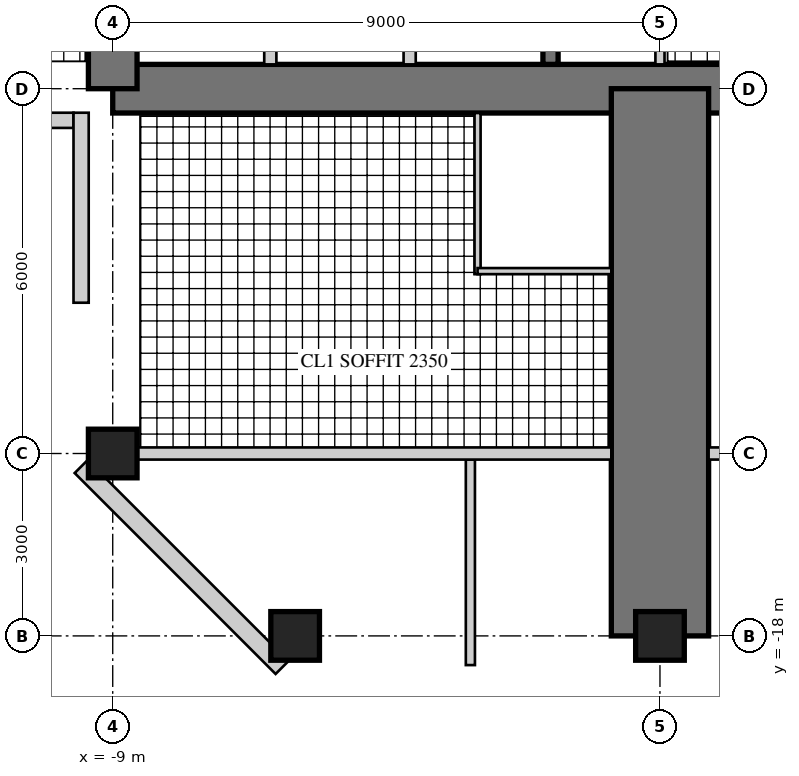
"""IFC4 building model, lengths in metres.
Left out: names, types, materials, properties, quantities, classifications, styles, units other than length and angle.
Written with IfcOpenShell. Run it as: python <this file> out.ifc"""

import sys

from ifc_helpers import new_model, si_unit, direction, frame, frame_2d, origin, origin_2d, place, context, subcontext, project, spatial, rectangle, hollow_rectangle, extrude, element, fill, save


model = new_model("IFC4")
c1 = context("Model", 3, precision=1e-05, world=origin(), true_north=direction((0.0, 1.0)))
c2 = subcontext(c1, "Body", "Model", "MODEL_VIEW")
j1 = project(units=[si_unit("LENGTHUNIT", "METRE"), si_unit("PLANEANGLEUNIT", "RADIAN")], contexts=[c1])
p1 = place(None, origin())
s1 = spatial("IfcSite", under=j1, at=p1, CompositionType="ELEMENT")
p2 = place(p1, origin())
s2 = spatial("IfcBuilding", under=s1, at=p2, CompositionType="ELEMENT")
p3 = place(p2, frame((0.0, 0.0, 225.5)))
s3 = spatial("IfcBuildingStorey", under=s2, at=p3, CompositionType="ELEMENT", Elevation=225.5)
p4 = place(p3, frame((-9.0, -9.0, 0.0), z_axis=(0.0, 0.0, 1.0), x_axis=(1.0, 0.0, 0.0)))
e1 = element("IfcWall", 1, at=p4, inside=s3, PredefinedType="SHEAR", context=c2, shape_type="SweptSolid", body=[
    extrude(rectangle(XDim=18.0, YDim=0.8, at=frame_2d((9.0, 0.0))), origin(), (0.0, 0.0, 1.0), 3.4),
])
p5 = place(p4, frame((9.8, 0.0, 0.0)))
e2 = element("IfcOpeningElement", 2, at=p5, cuts=e1, PredefinedType="OPENING", context=c2, shape_type="SweptSolid", body=[
    extrude(rectangle(XDim=1.0, YDim=2.4, at=frame_2d((0.5, 1.2))), frame((0.0, 0.41, 0.0), z_axis=(0.0, -1.0, 0.0), x_axis=(1.0, 0.0, 0.0)), (0.0, 0.0, 1.0), 0.82),
])
p6 = place(p3, frame((-9.0, 9.0, 0.0), z_axis=(0.0, 0.0, 1.0), x_axis=(0.0, -1.0, 0.0)))
e3 = element("IfcWall", 3, at=p6, inside=s3, PredefinedType="SHEAR", context=c2, shape_type="SweptSolid", body=[
    extrude(rectangle(XDim=18.0, YDim=0.8, at=frame_2d((9.0, 0.0))), origin(), (0.0, 0.0, 1.0), 3.4),
])
p7 = place(p6, frame((9.8, 0.0, 0.0)))
e4 = element("IfcOpeningElement", 4, at=p7, cuts=e3, PredefinedType="OPENING", context=c2, shape_type="SweptSolid", body=[
    extrude(rectangle(XDim=1.0, YDim=2.4, at=frame_2d((0.5, 1.2))), frame((0.0, 0.41, 0.0), z_axis=(0.0, -1.0, 0.0), x_axis=(1.0, 0.0, 0.0)), (0.0, 0.0, 1.0), 0.82),
])
p8 = place(p3, frame((-1.8, -1.875, 0.0), z_axis=(0.0, 0.0, 1.0), x_axis=(0.0, -1.0, 0.0)))
e5 = element("IfcWall", 5, at=p8, inside=s3, PredefinedType="SHEAR", context=c2, shape_type="SweptSolid", body=[
    extrude(rectangle(XDim=6.725, YDim=0.25, at=frame_2d((3.363, 0.0))), origin(), (0.0, 0.0, 1.0), 3.4),
])
p9 = place(p8, frame((1.875, 0.0, 0.0)))
e6 = element("IfcOpeningElement", 6, at=p9, cuts=e5, PredefinedType="OPENING", context=c2, shape_type="SweptSolid", body=[
    extrude(rectangle(XDim=1.6, YDim=2.4, at=frame_2d((0.8, 1.2))), frame((0.0, 0.135, 0.0), z_axis=(0.0, -1.0, 0.0), x_axis=(1.0, 0.0, 0.0)), (0.0, 0.0, 1.0), 0.27),
])
for number, where, z_axis, x_axis in (
    (7, (-4.117, -5.975, 0.0), (0.0, 0.0, 1.0), (0.0, -1.0, 0.0)),
    (8, (-6.408, -5.975, 0.0), (0.0, 0.0, 1.0), (0.0, -1.0, 0.0)),
):
    element("IfcWall", number, at=place(p3, frame(where, z_axis=z_axis, x_axis=x_axis)), inside=s3, PredefinedType="PARTITIONING", context=c2, shape_type="SweptSolid", body=[
        extrude(rectangle(XDim=2.625, YDim=0.2, at=frame_2d((1.312, 0.0))), origin(), (0.0, 0.0, 1.0), 3.4),
    ])
p10 = place(p3, frame((0.0, -9.0, 0.0), z_axis=(0.0, 0.0, 1.0), x_axis=(0.0, -1.0, 0.0)))
e9 = element("IfcWall", 9, at=p10, inside=s3, PredefinedType="SHEAR", context=c2, shape_type="SweptSolid", body=[
    extrude(rectangle(XDim=9.0, YDim=1.6, at=frame_2d((4.5, 0.0))), origin(), (0.0, 0.0, 1.0), 3.4),
])
p11 = place(p10, frame((3.8, 0.0, 0.0)))
e10 = element("IfcOpeningElement", 10, at=p11, cuts=e9, PredefinedType="OPENING", context=c2, shape_type="SweptSolid", body=[
    extrude(rectangle(XDim=1.0, YDim=2.15, at=frame_2d((0.5, 1.075))), frame((0.0, 0.81, 0.0), z_axis=(0.0, -1.0, 0.0), x_axis=(1.0, 0.0, 0.0)), (0.0, 0.0, 1.0), 1.62),
])
p12 = place(p10, frame((7.0, 0.0, 0.0)))
e11 = element("IfcOpeningElement", 11, at=p12, cuts=e9, PredefinedType="OPENING", context=c2, shape_type="SweptSolid", body=[
    extrude(rectangle(XDim=1.0, YDim=2.2, at=frame_2d((0.5, 1.1))), frame((0.0, 0.81, 0.0), z_axis=(0.0, -1.0, 0.0), x_axis=(1.0, 0.0, 0.0)), (0.0, 0.0, 1.0), 1.62),
])
for number, where, z_axis, x_axis in (
    (12, (-9.0, -15.0, 0.0), (0.0, 0.0, 1.0), (1.0, 0.0, 0.0)),
    (13, (-6.0, -18.0, 0.0), (0.0, 0.0, 1.0), (1.0, 0.0, 0.0)),
    (14, (0.0, -18.0, 0.0), (0.0, 0.0, 1.0), (1.0, 0.0, 0.0)),
):
    element("IfcColumn", number, at=place(p3, frame(where, z_axis=z_axis, x_axis=x_axis)), inside=s3, PredefinedType="COLUMN", context=c2, shape_type="SweptSolid", body=[
        extrude(rectangle(XDim=0.8, YDim=0.8, at=origin_2d()), origin(), (0.0, 0.0, 1.0), 3.4),
    ])
p13 = place(p3, frame((-12.52, -9.52, 0.0), z_axis=(0.0, 0.0, 1.0), x_axis=(1.0, 0.0, 0.0)))
e15 = element("IfcWall", 15, at=p13, inside=s3, PredefinedType="SOLIDWALL", context=c2, shape_type="SweptSolid", body=[
    extrude(rectangle(XDim=2.875, YDim=0.25, at=frame_2d((1.438, 0.0))), origin(), (0.0, 0.0, 1.0), 3.22),
])
p14 = place(p13, frame((0.6, 0.0, 0.0)))
e16 = element("IfcOpeningElement", 16, at=p14, cuts=e15, PredefinedType="OPENING", context=c2, shape_type="SweptSolid", body=[
    extrude(rectangle(XDim=1.0, YDim=2.2, at=frame_2d((0.5, 1.1))), frame((0.0, 0.135, 0.0), z_axis=(0.0, -1.0, 0.0), x_axis=(1.0, 0.0, 0.0)), (0.0, 0.0, 1.0), 0.27),
])
p15 = place(p3, frame((-9.52, -9.395, 0.0), z_axis=(0.0, 0.0, 1.0), x_axis=(0.0, -1.0, 0.0)))
e17 = element("IfcWall", 17, at=p15, inside=s3, PredefinedType="SOLIDWALL", context=c2, shape_type="SweptSolid", body=[
    extrude(rectangle(XDim=3.125, YDim=0.25, at=frame_2d((1.562, 0.0))), origin(), (0.0, 0.0, 1.0), 3.22),
])
p16 = place(p15, frame((0.6, 0.0, 0.0)))
e18 = element("IfcOpeningElement", 18, at=p16, cuts=e17, PredefinedType="OPENING", context=c2, shape_type="SweptSolid", body=[
    extrude(rectangle(XDim=1.0, YDim=2.2, at=frame_2d((0.5, 1.1))), frame((0.0, 0.135, 0.0), z_axis=(0.0, -1.0, 0.0), x_axis=(1.0, 0.0, 0.0)), (0.0, 0.0, 1.0), 0.27),
])
p17 = place(p3, frame((-9.52, -15.215, 0.0), z_axis=(0.0, 0.0, 1.0), x_axis=(0.707106781187, -0.707106781187, 0.0)))
e19 = element("IfcWall", 19, at=p17, inside=s3, PredefinedType="SOLIDWALL", context=c2, shape_type="SweptSolid", body=[
    extrude(rectangle(XDim=4.674, YDim=0.3, at=frame_2d((2.337, 0.0))), origin(), (0.0, 0.0, 1.0), 3.22),
])
p18 = place(p17, frame((1.887, 0.0, 0.3)))
e20 = element("IfcOpeningElement", 20, at=p18, cuts=e19, PredefinedType="OPENING", context=c2, shape_type="SweptSolid", body=[
    extrude(rectangle(XDim=0.9, YDim=2.4, at=frame_2d((0.45, 1.2))), frame((0.0, 0.16, 0.0), z_axis=(0.0, -1.0, 0.0), x_axis=(1.0, 0.0, 0.0)), (0.0, 0.0, 1.0), 0.32),
])
p19 = place(p3, frame((0.0, -5.675, 0.0), z_axis=(0.0, 0.0, 1.0), x_axis=(0.0, -1.0, 0.0)))
e21 = element("IfcWall", 21, at=p19, inside=s3, PredefinedType="PARTITIONING", context=c2, shape_type="SweptSolid", body=[
    extrude(rectangle(XDim=2.925, YDim=0.15, at=frame_2d((1.462, 0.0))), origin(), (0.0, 0.0, 1.0), 3.22),
])
p20 = place(p19, frame((0.4, 0.0, 0.0)))
e22 = element("IfcOpeningElement", 22, at=p20, cuts=e21, PredefinedType="OPENING", context=c2, shape_type="SweptSolid", body=[
    extrude(rectangle(XDim=1.0, YDim=2.1, at=frame_2d((0.5, 1.05))), frame((0.0, 0.085, 0.0), z_axis=(0.0, -1.0, 0.0), x_axis=(1.0, 0.0, 0.0)), (0.0, 0.0, 1.0), 0.17),
])
p21 = place(p3, frame((-3.0, -9.4, 0.0), z_axis=(0.0, 0.0, 1.0), x_axis=(0.0, -1.0, 0.0)))
e23 = element("IfcWall", 23, at=p21, inside=s3, PredefinedType="PARTITIONING", context=c2, shape_type="SweptSolid", body=[
    extrude(rectangle(XDim=2.65, YDim=0.1, at=frame_2d((1.325, 0.0))), origin(), (0.0, 0.0, 1.0), 3.22),
])
p22 = place(p3, frame((-3.0, -12.0, 0.0), z_axis=(0.0, 0.0, 1.0), x_axis=(1.0, 0.0, 0.0)))
e24 = element("IfcWall", 24, at=p22, inside=s3, PredefinedType="PARTITIONING", context=c2, shape_type="SweptSolid", body=[
    extrude(rectangle(XDim=2.2, YDim=0.1, at=frame_2d((1.1, 0.0))), origin(), (0.0, 0.0, 1.0), 3.22),
])
p23 = place(p22, frame((0.55, 0.0, 0.0)))
e25 = element("IfcOpeningElement", 25, at=p23, cuts=e24, PredefinedType="OPENING", context=c2, shape_type="SweptSolid", body=[
    extrude(rectangle(XDim=0.9, YDim=2.1, at=frame_2d((0.45, 1.05))), frame((0.0, 0.06, 0.0), z_axis=(0.0, -1.0, 0.0), x_axis=(1.0, 0.0, 0.0)), (0.0, 0.0, 1.0), 0.12),
])
p24 = place(p3, frame((-3.118, -15.1, 0.0), z_axis=(0.0, 0.0, 1.0), x_axis=(0.0, -1.0, 0.0)))
e26 = element("IfcWall", 26, at=p24, inside=s3, PredefinedType="PARTITIONING", context=c2, shape_type="SweptSolid", body=[
    extrude(rectangle(XDim=3.38, YDim=0.15, at=frame_2d((1.69, 0.0))), origin(), (0.0, 0.0, 1.0), 3.22),
])
p25 = place(p24, frame((0.6, 0.0, 0.0)))
e27 = element("IfcOpeningElement", 27, at=p25, cuts=e26, PredefinedType="OPENING", context=c2, shape_type="SweptSolid", body=[
    extrude(rectangle(XDim=1.0, YDim=2.1, at=frame_2d((0.5, 1.05))), frame((0.0, 0.085, 0.0), z_axis=(0.0, -1.0, 0.0), x_axis=(1.0, 0.0, 0.0)), (0.0, 0.0, 1.0), 0.17),
])
p26 = place(p3, frame((-8.6, -15.0, 0.0), z_axis=(0.0, 0.0, 1.0), x_axis=(1.0, 0.0, 0.0)))
e28 = element("IfcWall", 28, at=p26, inside=s3, PredefinedType="SOLIDWALL", context=c2, shape_type="SweptSolid", body=[
    extrude(rectangle(XDim=7.8, YDim=0.2, at=frame_2d((3.9, 0.0))), origin(), (0.0, 0.0, 1.0), 2.52),
])
p27 = place(p3, frame((0.8, -15.0, 0.0), z_axis=(0.0, 0.0, 1.0), x_axis=(1.0, 0.0, 0.0)))
e29 = element("IfcWall", 29, at=p27, inside=s3, PredefinedType="SOLIDWALL", context=c2, shape_type="SweptSolid", body=[
    extrude(rectangle(XDim=7.8, YDim=0.2, at=frame_2d((3.9, 0.0))), origin(), (0.0, 0.0, 1.0), 2.52),
])
p28 = place(p27, frame((0.35, 0.0, 0.0)))
e30 = element("IfcOpeningElement", 30, at=p28, cuts=e29, PredefinedType="OPENING", context=c2, shape_type="SweptSolid", body=[
    extrude(rectangle(XDim=1.0, YDim=2.2, at=frame_2d((0.5, 1.1))), frame((0.0, 0.11, 0.0), z_axis=(0.0, -1.0, 0.0), x_axis=(1.0, 0.0, 0.0)), (0.0, 0.0, 1.0), 0.22),
])
p29 = place(p16, origin())
e31 = element("IfcDoor", 31, at=p29, inside=s3, OperationType="SINGLE_SWING_LEFT", PredefinedType="DOOR", context=c2, shape_type="SweptSolid", body=[
    extrude(hollow_rectangle(XDim=1.0, YDim=2.2, WallThickness=0.06, at=frame_2d((0.5, 1.1))), frame((0.0, 0.025, 0.0), z_axis=(0.0, -1.0, 0.0), x_axis=(1.0, 0.0, 0.0)), (0.0, 0.0, 1.0), 0.05),
    extrude(rectangle(XDim=0.879, YDim=2.079, at=frame_2d((0.5, 1.1))), frame((0.0, 0.025, 0.0), z_axis=(0.0, -1.0, 0.0), x_axis=(1.0, 0.0, 0.0)), (0.0, 0.0, 1.0), 0.05),
])
fill(e18, e31)
p30 = place(p18, origin())
e32 = element("IfcWindow", 32, at=p30, inside=s3, PartitioningType="SINGLE_PANEL", PredefinedType="WINDOW", context=c2, shape_type="SweptSolid", body=[
    extrude(hollow_rectangle(XDim=0.9, YDim=2.4, WallThickness=0.06, at=frame_2d((0.45, 1.2))), frame((0.0, 0.03, 0.0), z_axis=(0.0, -1.0, 0.0), x_axis=(1.0, 0.0, 0.0)), (0.0, 0.0, 1.0), 0.06),
    extrude(rectangle(XDim=0.779, YDim=2.279, at=frame_2d((0.45, 1.2))), frame((0.0, 0.03, 0.0), z_axis=(0.0, -1.0, 0.0), x_axis=(1.0, 0.0, 0.0)), (0.0, 0.0, 1.0), 0.06),
])
fill(e20, e32)
p31 = place(p23, origin())
e33 = element("IfcDoor", 33, at=p31, inside=s3, OperationType="SINGLE_SWING_LEFT", PredefinedType="DOOR", context=c2, shape_type="SweptSolid", body=[
    extrude(rectangle(XDim=0.9, YDim=2.1, at=frame_2d((0.45, 1.05))), frame((0.0, 0.025, 0.0), z_axis=(0.0, -1.0, 0.0), x_axis=(1.0, 0.0, 0.0)), (0.0, 0.0, 1.0), 0.05),
])
fill(e25, e33)
p32 = place(p25, origin())
e34 = element("IfcDoor", 34, at=p32, inside=s3, OperationType="SINGLE_SWING_LEFT", PredefinedType="DOOR", context=c2, shape_type="SweptSolid", body=[
    extrude(rectangle(XDim=1.0, YDim=2.1, at=frame_2d((0.5, 1.05))), frame((0.0, 0.025, 0.0), z_axis=(0.0, -1.0, 0.0), x_axis=(1.0, 0.0, 0.0)), (0.0, 0.0, 1.0), 0.05),
])
fill(e27, e34)
p33 = place(p11, frame((1.0, 0.0, 0.0), z_axis=(0.0, 0.0, 1.0), x_axis=(-1.0, 0.0, 0.0)))
e35 = element("IfcDoor", 35, at=p33, inside=s3, OperationType="SINGLE_SWING_RIGHT", PredefinedType="DOOR", context=c2, shape_type="SweptSolid", body=[
    extrude(rectangle(XDim=1.0, YDim=2.15, at=frame_2d((0.5, 1.075))), frame((0.0, 0.025, 0.0), z_axis=(0.0, -1.0, 0.0), x_axis=(1.0, 0.0, 0.0)), (0.0, 0.0, 1.0), 0.05),
])
fill(e10, e35)
p34 = place(p12, origin())
e36 = element("IfcDoor", 36, at=p34, inside=s3, OperationType="SINGLE_SWING_LEFT", PredefinedType="DOOR", context=c2, shape_type="SweptSolid", body=[
    extrude(rectangle(XDim=1.0, YDim=2.2, at=frame_2d((0.5, 1.1))), frame((0.0, 0.025, 0.0), z_axis=(0.0, -1.0, 0.0), x_axis=(1.0, 0.0, 0.0)), (0.0, 0.0, 1.0), 0.05),
])
fill(e11, e36)
p35 = place(p5, origin())
e37 = element("IfcDoor", 37, at=p35, inside=s3, OperationType="SINGLE_SWING_RIGHT", PredefinedType="DOOR", context=c2, shape_type="SweptSolid", body=[
    extrude(rectangle(XDim=1.0, YDim=2.4, at=frame_2d((0.5, 1.2))), frame((0.0, 0.055, 0.0), z_axis=(0.0, -1.0, 0.0), x_axis=(1.0, 0.0, 0.0)), (0.0, 0.0, 1.0), 0.05),
])
fill(e2, e37)
save(model, sys.argv[1])
